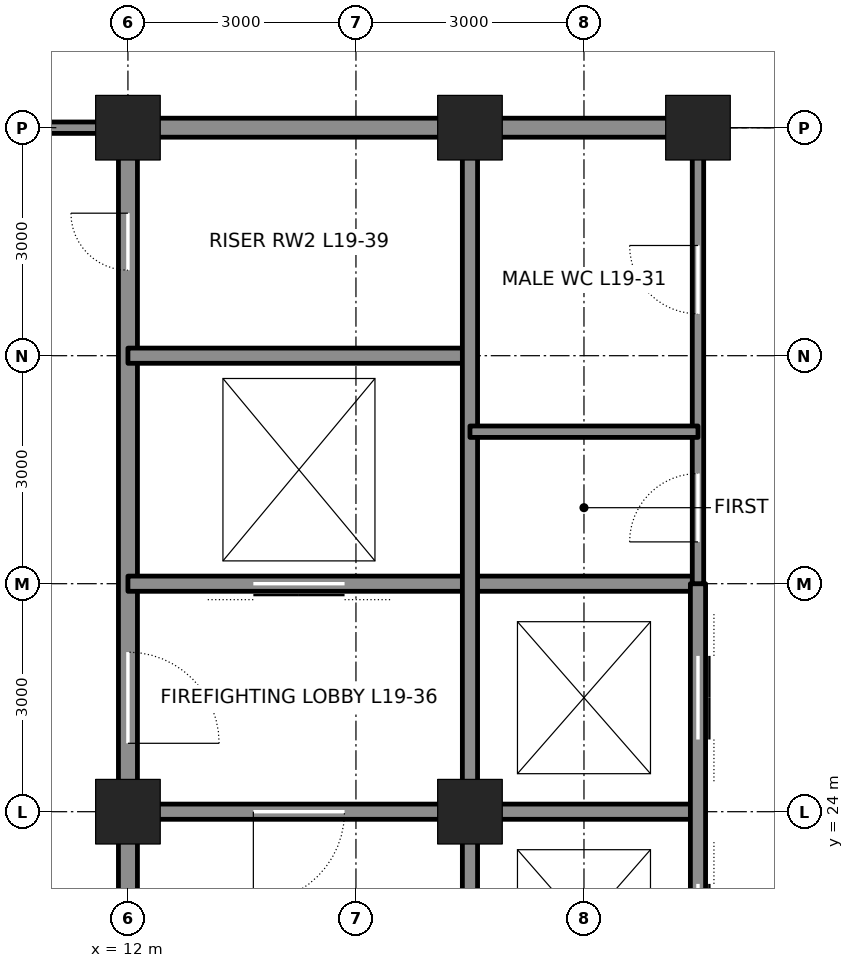
"""IFC4 building model, lengths in metres.
Left out: names, types, materials, properties, quantities, classifications, styles, units other than length and angle.
Written with IfcOpenShell. Run it as: python <this file> out.ifc"""

import sys

from ifc_helpers import new_model, si_unit, direction, frame, frame_2d, origin, origin_2d, place, context, subcontext, project, spatial, rectangle, hollow_rectangle, extrude, element, fill, save


model = new_model("IFC4")
c1 = context("Model", 3, precision=1e-05, world=origin(), true_north=direction((0.0, 1.0)))
c2 = subcontext(c1, "Body", "Model", "MODEL_VIEW")
j1 = project(units=[si_unit("LENGTHUNIT", "METRE"), si_unit("PLANEANGLEUNIT", "RADIAN")], contexts=[c1])
p1 = place(None, origin())
s1 = spatial("IfcSite", under=j1, at=p1, CompositionType="ELEMENT")
p2 = place(p1, origin())
s2 = spatial("IfcBuilding", under=s1, at=p2, CompositionType="ELEMENT")
p3 = place(p2, frame((0.0, 0.0, 91.8)))
s3 = spatial("IfcBuildingStorey", under=s2, at=p3, CompositionType="ELEMENT", Elevation=91.8)
for number, where, z_axis, x_axis in (
    (1, (12.0, 33.0, 0.0), (0.0, 0.0, 1.0), (1.0, 0.0, 0.0)),
    (2, (16.5, 33.0, 0.0), (0.0, 0.0, 1.0), (1.0, 0.0, 0.0)),
    (3, (19.5, 33.0, 0.0), (0.0, 0.0, 1.0), (1.0, 0.0, 0.0)),
    (4, (12.0, 24.0, 0.0), (0.0, 0.0, 1.0), (1.0, 0.0, 0.0)),
    (5, (16.5, 24.0, 0.0), (0.0, 0.0, 1.0), (1.0, 0.0, 0.0)),
):
    element("IfcColumn", number, at=place(p3, frame(where, z_axis=z_axis, x_axis=x_axis)), inside=s3, PredefinedType="COLUMN", context=c2, shape_type="SweptSolid", body=[
        extrude(hollow_rectangle(XDim=0.85, YDim=0.85, WallThickness=0.085, at=origin_2d()), origin(), (0.0, 0.0, 1.0), 4.5),
    ])
p4 = place(p3, frame((12.0, 21.25, 0.0), z_axis=(0.0, 0.0, 1.0), x_axis=(0.0, 1.0, 0.0)))
e6 = element("IfcWall", 6, at=p4, inside=s3, PredefinedType="SOLIDWALL", context=c2, shape_type="SweptSolid", body=[
    extrude(rectangle(XDim=2.5, YDim=0.25, at=frame_2d((1.25, 0.0))), origin(), (0.0, 0.0, 1.0), 3.413),
])
p5 = place(p3, frame((12.0, 24.25, 0.0), z_axis=(0.0, 0.0, 1.0), x_axis=(0.0, 1.0, 0.0)))
e7 = element("IfcWall", 7, at=p5, inside=s3, PredefinedType="SOLIDWALL", context=c2, shape_type="SweptSolid", body=[
    extrude(rectangle(XDim=8.5, YDim=0.25, at=frame_2d((4.25, 0.0))), origin(), (0.0, 0.0, 1.0), 3.413),
])
p6 = place(p5, frame((0.65, 0.0, 0.0)))
e8 = element("IfcOpeningElement", 8, at=p6, cuts=e7, PredefinedType="OPENING", context=c2, shape_type="SweptSolid", body=[
    extrude(rectangle(XDim=1.2, YDim=2.1, at=frame_2d((0.6, 1.05))), frame((0.0, 0.135, 0.0), z_axis=(0.0, -1.0, 0.0), x_axis=(1.0, 0.0, 0.0)), (0.0, 0.0, 1.0), 0.27),
])
p7 = place(p5, frame((6.875, 0.0, 0.0)))
e9 = element("IfcOpeningElement", 9, at=p7, cuts=e7, PredefinedType="OPENING", context=c2, shape_type="SweptSolid", body=[
    extrude(rectangle(XDim=0.75, YDim=2.1, at=frame_2d((0.375, 1.05))), frame((0.0, 0.135, 0.0), z_axis=(0.0, -1.0, 0.0), x_axis=(1.0, 0.0, 0.0)), (0.0, 0.0, 1.0), 0.27),
])
p8 = place(p3, frame((12.25, 24.0, 0.0), z_axis=(0.0, 0.0, 1.0), x_axis=(1.0, 0.0, 0.0)))
e10 = element("IfcWall", 10, at=p8, inside=s3, PredefinedType="SOLIDWALL", context=c2, shape_type="SweptSolid", body=[
    extrude(rectangle(XDim=4.0, YDim=0.2, at=frame_2d((2.0, 0.0))), origin(), (0.0, 0.0, 1.0), 3.39),
])
p9 = place(p8, frame((1.4, 0.0, 0.0)))
e11 = element("IfcOpeningElement", 11, at=p9, cuts=e10, PredefinedType="OPENING", context=c2, shape_type="SweptSolid", body=[
    extrude(rectangle(XDim=1.2, YDim=2.1, at=frame_2d((0.6, 1.05))), frame((0.0, 0.11, 0.0), z_axis=(0.0, -1.0, 0.0), x_axis=(1.0, 0.0, 0.0)), (0.0, 0.0, 1.0), 0.22),
])
p10 = place(p3, frame((16.75, 24.0, 0.0), z_axis=(0.0, 0.0, 1.0), x_axis=(1.0, 0.0, 0.0)))
e12 = element("IfcWall", 12, at=p10, inside=s3, PredefinedType="SOLIDWALL", context=c2, shape_type="SweptSolid", body=[
    extrude(rectangle(XDim=2.75, YDim=0.2, at=frame_2d((1.375, 0.0))), origin(), (0.0, 0.0, 1.0), 3.39),
])
p11 = place(p3, frame((12.0, 27.0, 0.0), z_axis=(0.0, 0.0, 1.0), x_axis=(1.0, 0.0, 0.0)))
e13 = element("IfcWall", 13, at=p11, inside=s3, PredefinedType="SOLIDWALL", context=c2, shape_type="SweptSolid", body=[
    extrude(rectangle(XDim=7.5, YDim=0.2, at=frame_2d((3.75, 0.0))), origin(), (0.0, 0.0, 1.0), 4.34),
])
p12 = place(p11, frame((1.65, 0.0, 0.0)))
e14 = element("IfcOpeningElement", 14, at=p12, cuts=e13, PredefinedType="OPENING", context=c2, shape_type="SweptSolid", body=[
    extrude(rectangle(XDim=1.2, YDim=2.1, at=frame_2d((0.6, 1.05))), frame((0.0, 0.11, 0.0), z_axis=(0.0, -1.0, 0.0), x_axis=(1.0, 0.0, 0.0)), (0.0, 0.0, 1.0), 0.22),
])
p13 = place(p3, frame((12.0, 30.0, 0.0), z_axis=(0.0, 0.0, 1.0), x_axis=(1.0, 0.0, 0.0)))
e15 = element("IfcWall", 15, at=p13, inside=s3, PredefinedType="SOLIDWALL", context=c2, shape_type="SweptSolid", body=[
    extrude(rectangle(XDim=4.5, YDim=0.2, at=frame_2d((2.25, 0.0))), origin(), (0.0, 0.0, 1.0), 4.34),
])
p14 = place(p3, frame((12.25, 33.0, 0.0), z_axis=(0.0, 0.0, 1.0), x_axis=(1.0, 0.0, 0.0)))
e16 = element("IfcWall", 16, at=p14, inside=s3, PredefinedType="SOLIDWALL", context=c2, shape_type="SweptSolid", body=[
    extrude(rectangle(XDim=4.0, YDim=0.25, at=frame_2d((2.0, 0.0))), origin(), (0.0, 0.0, 1.0), 3.481),
])
p15 = place(p3, frame((16.75, 33.0, 0.0), z_axis=(0.0, 0.0, 1.0), x_axis=(1.0, 0.0, 0.0)))
e17 = element("IfcWall", 17, at=p15, inside=s3, PredefinedType="SOLIDWALL", context=c2, shape_type="SweptSolid", body=[
    extrude(rectangle(XDim=2.5, YDim=0.25, at=frame_2d((1.25, 0.0))), origin(), (0.0, 0.0, 1.0), 3.481),
])
p16 = place(p3, frame((16.5, 21.25, 0.0), z_axis=(0.0, 0.0, 1.0), x_axis=(0.0, 1.0, 0.0)))
e18 = element("IfcWall", 18, at=p16, inside=s3, PredefinedType="SOLIDWALL", context=c2, shape_type="SweptSolid", body=[
    extrude(rectangle(XDim=2.5, YDim=0.2, at=frame_2d((1.25, 0.0))), origin(), (0.0, 0.0, 1.0), 3.413),
])
p17 = place(p3, frame((16.5, 24.25, 0.0), z_axis=(0.0, 0.0, 1.0), x_axis=(0.0, 1.0, 0.0)))
e19 = element("IfcWall", 19, at=p17, inside=s3, PredefinedType="SOLIDWALL", context=c2, shape_type="SweptSolid", body=[
    extrude(rectangle(XDim=8.5, YDim=0.2, at=frame_2d((4.25, 0.0))), origin(), (0.0, 0.0, 1.0), 3.413),
])
p18 = place(p3, frame((19.5, 15.0, 0.0), z_axis=(0.0, 0.0, 1.0), x_axis=(0.0, 1.0, 0.0)))
e20 = element("IfcWall", 20, at=p18, inside=s3, PredefinedType="SOLIDWALL", context=c2, shape_type="SweptSolid", body=[
    extrude(rectangle(XDim=12.0, YDim=0.2, at=frame_2d((6.0, 0.0))), origin(), (0.0, 0.0, 1.0), 3.365),
])
p19 = place(p18, frame((0.95, 0.0, 0.0)))
e21 = element("IfcOpeningElement", 21, at=p19, cuts=e20, PredefinedType="OPENING", context=c2, shape_type="SweptSolid", body=[
    extrude(rectangle(XDim=1.1, YDim=2.1, at=frame_2d((0.55, 1.05))), frame((0.0, 0.11, 0.0), z_axis=(0.0, -1.0, 0.0), x_axis=(1.0, 0.0, 0.0)), (0.0, 0.0, 1.0), 0.22),
])
p20 = place(p18, frame((3.95, 0.0, 0.0)))
e22 = element("IfcOpeningElement", 22, at=p20, cuts=e20, PredefinedType="OPENING", context=c2, shape_type="SweptSolid", body=[
    extrude(rectangle(XDim=1.1, YDim=2.1, at=frame_2d((0.55, 1.05))), frame((0.0, 0.11, 0.0), z_axis=(0.0, -1.0, 0.0), x_axis=(1.0, 0.0, 0.0)), (0.0, 0.0, 1.0), 0.22),
])
p21 = place(p18, frame((6.95, 0.0, 0.0)))
e23 = element("IfcOpeningElement", 23, at=p21, cuts=e20, PredefinedType="OPENING", context=c2, shape_type="SweptSolid", body=[
    extrude(rectangle(XDim=1.1, YDim=2.1, at=frame_2d((0.55, 1.05))), frame((0.0, 0.11, 0.0), z_axis=(0.0, -1.0, 0.0), x_axis=(1.0, 0.0, 0.0)), (0.0, 0.0, 1.0), 0.22),
])
p22 = place(p18, frame((9.95, 0.0, 0.0)))
e24 = element("IfcOpeningElement", 24, at=p22, cuts=e20, PredefinedType="OPENING", context=c2, shape_type="SweptSolid", body=[
    extrude(rectangle(XDim=1.1, YDim=2.1, at=frame_2d((0.55, 1.05))), frame((0.0, 0.11, 0.0), z_axis=(0.0, -1.0, 0.0), x_axis=(1.0, 0.0, 0.0)), (0.0, 0.0, 1.0), 0.22),
])
p23 = place(p3, frame((19.5, 27.0, 0.0), z_axis=(0.0, 0.0, 1.0), x_axis=(0.0, 1.0, 0.0)))
e25 = element("IfcWall", 25, at=p23, inside=s3, PredefinedType="PARTITIONING", context=c2, shape_type="SweptSolid", body=[
    extrude(rectangle(XDim=5.75, YDim=0.15, at=frame_2d((2.875, 0.0))), origin(), (0.0, 0.0, 1.0), 3.365),
])
p24 = place(p23, frame((0.55, 0.0, 0.0)))
e26 = element("IfcOpeningElement", 26, at=p24, cuts=e25, PredefinedType="OPENING", context=c2, shape_type="SweptSolid", body=[
    extrude(rectangle(XDim=0.9, YDim=2.1, at=frame_2d((0.45, 1.05))), frame((0.0, 0.085, 0.0), z_axis=(0.0, -1.0, 0.0), x_axis=(1.0, 0.0, 0.0)), (0.0, 0.0, 1.0), 0.17),
])
p25 = place(p23, frame((3.55, 0.0, 0.0)))
e27 = element("IfcOpeningElement", 27, at=p25, cuts=e25, PredefinedType="OPENING", context=c2, shape_type="SweptSolid", body=[
    extrude(rectangle(XDim=0.9, YDim=2.1, at=frame_2d((0.45, 1.05))), frame((0.0, 0.085, 0.0), z_axis=(0.0, -1.0, 0.0), x_axis=(1.0, 0.0, 0.0)), (0.0, 0.0, 1.0), 0.17),
])
p26 = place(p3, frame((16.5, 29.0, 0.0), z_axis=(0.0, 0.0, 1.0), x_axis=(1.0, 0.0, 0.0)))
e28 = element("IfcWall", 28, at=p26, inside=s3, PredefinedType="PARTITIONING", context=c2, shape_type="SweptSolid", body=[
    extrude(rectangle(XDim=3.0, YDim=0.15, at=frame_2d((1.5, 0.0))), origin(), (0.0, 0.0, 1.0), 4.34),
])
p27 = place(p3, frame((10.2, 33.0, -0.3), z_axis=(0.0, 0.0, 1.0), x_axis=(1.0, 0.0, 0.0)))
e29 = element("IfcWall", 29, at=p27, inside=s3, PredefinedType="PARTITIONING", context=c2, shape_type="SweptSolid", body=[
    extrude(rectangle(XDim=1.8, YDim=0.15, at=frame_2d((0.9, 0.0))), origin(), (0.0, 0.0, 1.0), 3.693),
])
p28 = place(p9, frame((1.2, 0.0, 0.0), z_axis=(0.0, 0.0, 1.0), x_axis=(-1.0, 0.0, 0.0)))
e30 = element("IfcDoor", 30, at=p28, inside=s3, OperationType="SINGLE_SWING_RIGHT", PredefinedType="DOOR", context=c2, shape_type="SweptSolid", body=[
    extrude(rectangle(XDim=1.2, YDim=2.1, at=frame_2d((0.6, 1.05))), frame((0.0, 0.025, 0.0), z_axis=(0.0, -1.0, 0.0), x_axis=(1.0, 0.0, 0.0)), (0.0, 0.0, 1.0), 0.05),
])
fill(e11, e30)
p29 = place(p6, frame((1.2, 0.0, 0.0), z_axis=(0.0, 0.0, 1.0), x_axis=(-1.0, 0.0, 0.0)))
e31 = element("IfcDoor", 31, at=p29, inside=s3, OperationType="SINGLE_SWING_RIGHT", PredefinedType="DOOR", context=c2, shape_type="SweptSolid", body=[
    extrude(rectangle(XDim=1.2, YDim=2.1, at=frame_2d((0.6, 1.05))), frame((0.0, 0.025, 0.0), z_axis=(0.0, -1.0, 0.0), x_axis=(1.0, 0.0, 0.0)), (0.0, 0.0, 1.0), 0.05),
])
fill(e8, e31)
p30 = place(p12, origin())
e32 = element("IfcDoor", 32, at=p30, inside=s3, OperationType="DOUBLE_DOOR_SLIDING", PredefinedType="DOOR", context=c2, shape_type="SweptSolid", body=[
    extrude(rectangle(XDim=1.2, YDim=2.1, at=frame_2d((0.6, 1.05))), frame((0.0, 0.025, 0.0), z_axis=(0.0, -1.0, 0.0), x_axis=(1.0, 0.0, 0.0)), (0.0, 0.0, 1.0), 0.05),
])
fill(e14, e32)
p31 = place(p7, origin())
e33 = element("IfcDoor", 33, at=p31, inside=s3, OperationType="SINGLE_SWING_RIGHT", PredefinedType="DOOR", context=c2, shape_type="SweptSolid", body=[
    extrude(rectangle(XDim=0.75, YDim=2.1, at=frame_2d((0.375, 1.05))), frame((0.0, 0.025, 0.0), z_axis=(0.0, -1.0, 0.0), x_axis=(1.0, 0.0, 0.0)), (0.0, 0.0, 1.0), 0.05),
])
fill(e9, e33)
p32 = place(p24, origin())
e34 = element("IfcDoor", 34, at=p32, inside=s3, OperationType="SINGLE_SWING_LEFT", PredefinedType="DOOR", context=c2, shape_type="SweptSolid", body=[
    extrude(rectangle(XDim=0.9, YDim=2.1, at=frame_2d((0.45, 1.05))), frame((0.0, 0.025, 0.0), z_axis=(0.0, -1.0, 0.0), x_axis=(1.0, 0.0, 0.0)), (0.0, 0.0, 1.0), 0.05),
])
fill(e26, e34)
p33 = place(p25, origin())
e35 = element("IfcDoor", 35, at=p33, inside=s3, OperationType="SINGLE_SWING_RIGHT", PredefinedType="DOOR", context=c2, shape_type="SweptSolid", body=[
    extrude(rectangle(XDim=0.9, YDim=2.1, at=frame_2d((0.45, 1.05))), frame((0.0, 0.025, 0.0), z_axis=(0.0, -1.0, 0.0), x_axis=(1.0, 0.0, 0.0)), (0.0, 0.0, 1.0), 0.05),
])
fill(e27, e35)
p34 = place(p21, origin())
e36 = element("IfcDoor", 36, at=p34, inside=s3, OperationType="DOUBLE_DOOR_SLIDING", PredefinedType="DOOR", context=c2, shape_type="SweptSolid", body=[
    extrude(rectangle(XDim=1.1, YDim=2.1, at=frame_2d((0.55, 1.05))), frame((0.0, 0.025, 0.0), z_axis=(0.0, -1.0, 0.0), x_axis=(1.0, 0.0, 0.0)), (0.0, 0.0, 1.0), 0.05),
])
fill(e23, e36)
p35 = place(p22, origin())
e37 = element("IfcDoor", 37, at=p35, inside=s3, OperationType="DOUBLE_DOOR_SLIDING", PredefinedType="DOOR", context=c2, shape_type="SweptSolid", body=[
    extrude(rectangle(XDim=1.1, YDim=2.1, at=frame_2d((0.55, 1.05))), frame((0.0, 0.025, 0.0), z_axis=(0.0, -1.0, 0.0), x_axis=(1.0, 0.0, 0.0)), (0.0, 0.0, 1.0), 0.05),
])
fill(e24, e37)
save(model, sys.argv[1])
